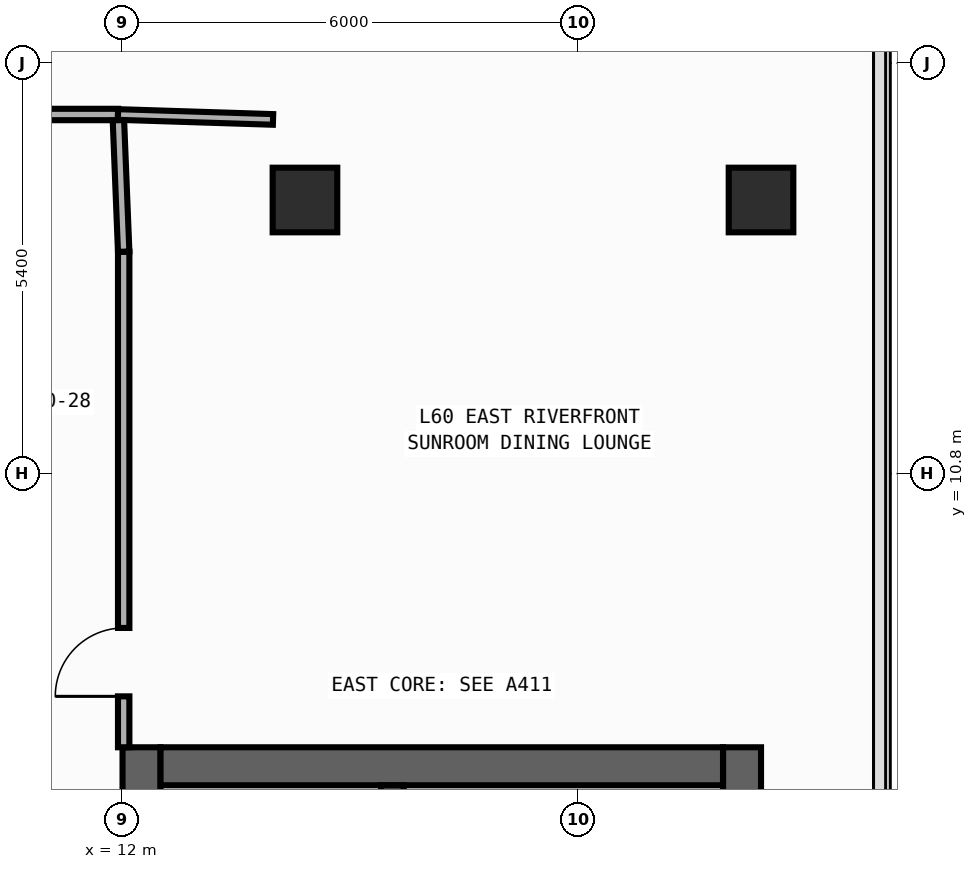
"""IFC4 building model, lengths in metres.
Left out: names, types, materials, properties, quantities, classifications, styles, units other than length and angle.
Written with IfcOpenShell. Run it as: python <this file> out.ifc"""

import sys

from ifc_helpers import new_model, si_unit, direction, frame, frame_2d, origin, origin_2d, place, context, subcontext, project, spatial, rectangle, extrude, element, fill, save


model = new_model("IFC4")
c1 = context("Model", 3, precision=1e-05, world=origin(), true_north=direction((0.0, 1.0)))
c2 = subcontext(c1, "Body", "Model", "MODEL_VIEW")
j1 = project(units=[si_unit("LENGTHUNIT", "METRE"), si_unit("PLANEANGLEUNIT", "RADIAN")], contexts=[c1])
p1 = place(None, origin())
s1 = spatial("IfcSite", under=j1, at=p1, CompositionType="ELEMENT")
p2 = place(p1, origin())
s2 = spatial("IfcBuilding", under=s1, at=p2, CompositionType="ELEMENT")
p3 = place(p2, frame((0.0, 0.0, 254.8)))
s3 = spatial("IfcBuildingStorey", under=s2, at=p3, CompositionType="ELEMENT", Elevation=254.8)
p4 = place(p3, frame((12.25, -19.8, 0.0), z_axis=(0.0, 0.0, 1.0), x_axis=(0.0, 1.0, 0.0)))
e1 = element("IfcWall", 1, at=p4, inside=s3, PredefinedType="SHEAR", context=c2, shape_type="SweptSolid", body=[
    extrude(rectangle(XDim=27.0, YDim=0.5, at=frame_2d((13.5, 0.0))), origin(), (0.0, 0.0, 1.0), 3.34),
])
p5 = place(p4, frame((23.05, 0.0, 0.0)))
e2 = element("IfcOpeningElement", 2, at=p5, cuts=e1, PredefinedType="OPENING", context=c2, shape_type="SweptSolid", body=[
    extrude(rectangle(XDim=1.1, YDim=2.2, at=frame_2d((0.55, 1.1))), frame((0.0, 0.26, 0.0), z_axis=(0.0, -1.0, 0.0), x_axis=(1.0, 0.0, 0.0)), (0.0, 0.0, 1.0), 0.52),
])
p6 = place(p4, frame((19.85, 0.0, 0.0)))
e3 = element("IfcOpeningElement", 3, at=p6, cuts=e1, PredefinedType="OPENING", context=c2, shape_type="SweptSolid", body=[
    extrude(rectangle(XDim=1.1, YDim=2.2, at=frame_2d((0.55, 1.1))), frame((0.0, 0.26, 0.0), z_axis=(0.0, -1.0, 0.0), x_axis=(1.0, 0.0, 0.0)), (0.0, 0.0, 1.0), 0.52),
])
p7 = place(p4, frame((16.65, 0.0, 0.0)))
e4 = element("IfcOpeningElement", 4, at=p7, cuts=e1, PredefinedType="OPENING", context=c2, shape_type="SweptSolid", body=[
    extrude(rectangle(XDim=1.1, YDim=2.2, at=frame_2d((0.55, 1.1))), frame((0.0, 0.26, 0.0), z_axis=(0.0, -1.0, 0.0), x_axis=(1.0, 0.0, 0.0)), (0.0, 0.0, 1.0), 0.52),
])
p8 = place(p4, frame((7.175, 0.0, 0.0)))
e5 = element("IfcOpeningElement", 5, at=p8, cuts=e1, PredefinedType="OPENING", context=c2, shape_type="SweptSolid", body=[
    extrude(rectangle(XDim=0.85, YDim=2.1, at=frame_2d((0.425, 1.05))), frame((0.0, 0.26, 0.0), z_axis=(0.0, -1.0, 0.0), x_axis=(1.0, 0.0, 0.0)), (0.0, 0.0, 1.0), 0.52),
])
p9 = place(p4, frame((10.375, 0.0, 0.0)))
e6 = element("IfcOpeningElement", 6, at=p9, cuts=e1, PredefinedType="OPENING", context=c2, shape_type="SweptSolid", body=[
    extrude(rectangle(XDim=0.85, YDim=2.1, at=frame_2d((0.425, 1.05))), frame((0.0, 0.26, 0.0), z_axis=(0.0, -1.0, 0.0), x_axis=(1.0, 0.0, 0.0)), (0.0, 0.0, 1.0), 0.52),
])
p10 = place(p4, frame((12.725, 0.0, 0.0)))
e7 = element("IfcOpeningElement", 7, at=p10, cuts=e1, PredefinedType="OPENING", context=c2, shape_type="SweptSolid", body=[
    extrude(rectangle(XDim=1.15, YDim=2.2, at=frame_2d((0.575, 1.1))), frame((0.0, 0.26, 0.0), z_axis=(0.0, -1.0, 0.0), x_axis=(1.0, 0.0, 0.0)), (0.0, 0.0, 1.0), 0.52),
])
p11 = place(p4, frame((25.125, 0.0, 0.0)))
e8 = element("IfcOpeningElement", 8, at=p11, cuts=e1, PredefinedType="OPENING", context=c2, shape_type="SweptSolid", body=[
    extrude(rectangle(XDim=0.85, YDim=2.1, at=frame_2d((0.425, 1.05))), frame((0.0, 0.26, 0.0), z_axis=(0.0, -1.0, 0.0), x_axis=(1.0, 0.0, 0.0)), (0.0, 0.0, 1.0), 0.52),
])
p12 = place(p3, frame((20.15, -19.8, 0.0), z_axis=(0.0, 0.0, 1.0), x_axis=(0.0, 1.0, 0.0)))
e9 = element("IfcWall", 9, at=p12, inside=s3, PredefinedType="SHEAR", context=c2, shape_type="SweptSolid", body=[
    extrude(rectangle(XDim=27.0, YDim=0.5, at=frame_2d((13.5, 0.0))), origin(), (0.0, 0.0, 1.0), 3.34),
])
p13 = place(p3, frame((12.5, 6.95, 0.0), z_axis=(0.0, 0.0, 1.0), x_axis=(1.0, 0.0, 0.0)))
e10 = element("IfcWall", 10, at=p13, inside=s3, PredefinedType="SHEAR", context=c2, shape_type="SweptSolid", body=[
    extrude(rectangle(XDim=7.4, YDim=0.5, at=frame_2d((3.7, 0.0))), origin(), (0.0, 0.0, 1.0), 3.34),
])
p14 = place(p3, frame((15.55, -19.3, 0.0), z_axis=(0.0, 0.0, 1.0), x_axis=(0.0, 1.0, 0.0)))
e11 = element("IfcWall", 11, at=p14, inside=s3, PredefinedType="SHEAR", context=c2, shape_type="SweptSolid", body=[
    extrude(rectangle(XDim=26.0, YDim=0.3, at=frame_2d((13.0, 0.0))), origin(), (0.0, 0.0, 1.0), 3.34),
])
p15 = place(p14, frame((12.225, 0.0, 0.0)))
e12 = element("IfcOpeningElement", 12, at=p15, cuts=e11, PredefinedType="OPENING", context=c2, shape_type="SweptSolid", body=[
    extrude(rectangle(XDim=1.15, YDim=2.2, at=frame_2d((0.575, 1.1))), frame((0.0, 0.16, 0.0), z_axis=(0.0, -1.0, 0.0), x_axis=(1.0, 0.0, 0.0)), (0.0, 0.0, 1.0), 0.32),
])
p16 = place(p14, frame((24.625, 0.0, 0.0)))
e13 = element("IfcOpeningElement", 13, at=p16, cuts=e11, PredefinedType="OPENING", context=c2, shape_type="SweptSolid", body=[
    extrude(rectangle(XDim=0.85, YDim=2.1, at=frame_2d((0.425, 1.05))), frame((0.0, 0.16, 0.0), z_axis=(0.0, -1.0, 0.0), x_axis=(1.0, 0.0, 0.0)), (0.0, 0.0, 1.0), 0.32),
])
for number, where, z_axis, x_axis in (
    (14, (20.4, 14.4, 0.0), (0.0, 0.0, 1.0), (1.0, 0.0, 0.0)),
    (15, (14.4, 14.4, 0.0), (0.0, 0.0, 1.0), (1.0, 0.0, 0.0)),
):
    element("IfcColumn", number, at=place(p3, frame(where, z_axis=z_axis, x_axis=x_axis)), inside=s3, PredefinedType="COLUMN", context=c2, shape_type="SweptSolid", body=[
        extrude(rectangle(XDim=0.85, YDim=0.85, at=origin_2d()), origin(), (0.0, 0.0, 1.0), 3.6),
    ])
p17 = place(p3, frame((12.015, 7.2, 0.0), z_axis=(0.0, 0.0, 1.0), x_axis=(0.0, 1.0, 0.0)))
e16 = element("IfcWall", 16, at=p17, inside=s3, PredefinedType="PARTITIONING", context=c2, shape_type="SweptSolid", body=[
    extrude(rectangle(XDim=6.52, YDim=0.15, at=frame_2d((3.26, 0.0))), origin(), (0.0, 0.0, 1.0), 3.34),
])
p18 = place(p17, frame((0.67, 0.0, 0.0)))
e17 = element("IfcOpeningElement", 17, at=p18, cuts=e16, PredefinedType="OPENING", context=c2, shape_type="SweptSolid", body=[
    extrude(rectangle(XDim=0.9, YDim=2.15, at=frame_2d((0.45, 1.075))), frame((0.0, 0.085, 0.0), z_axis=(0.0, -1.0, 0.0), x_axis=(1.0, 0.0, 0.0)), (0.0, 0.0, 1.0), 0.17),
])
p19 = place(p3, frame((9.86, 15.525, 0.0), z_axis=(0.0, 0.0, 1.0), x_axis=(1.0, 0.0, 0.0)))
e18 = element("IfcWall", 18, at=p19, inside=s3, PredefinedType="PARTITIONING", context=c2, shape_type="SweptSolid", body=[
    extrude(rectangle(XDim=2.08, YDim=0.15, at=frame_2d((1.04, 0.0))), origin(), (0.0, 0.0, 1.0), 3.34),
])
p20 = place(p3, frame((12.015, 13.72, 0.0), z_axis=(0.0, 0.0, 1.0), x_axis=(-0.040046877756, 0.99919780203, 0.0)))
e19 = element("IfcWall", 19, at=p20, inside=s3, PredefinedType="PARTITIONING", context=c2, shape_type="SweptSolid", body=[
    extrude(rectangle(XDim=1.731, YDim=0.15, at=frame_2d((0.866, 0.0))), origin(), (0.0, 0.0, 1.0), 3.34),
])
p21 = place(p3, frame((11.94, 15.525, 0.0), z_axis=(0.0, 0.0, 1.0), x_axis=(0.999493701671, -0.031817295912, 0.0)))
e20 = element("IfcWall", 20, at=p21, inside=s3, PredefinedType="PARTITIONING", context=c2, shape_type="SweptSolid", body=[
    extrude(rectangle(XDim=2.041, YDim=0.14, at=frame_2d((1.021, 0.0))), origin(), (0.0, 0.0, 1.0), 3.34),
])
p22 = place(p18, origin())
e21 = element("IfcDoor", 21, at=p22, inside=s3, OperationType="SINGLE_SWING_LEFT", PredefinedType="DOOR", context=c2, shape_type="SweptSolid", body=[
    extrude(rectangle(XDim=0.9, YDim=2.15, at=frame_2d((0.45, 1.075))), frame((0.0, 0.025, 0.0), z_axis=(0.0, -1.0, 0.0), x_axis=(1.0, 0.0, 0.0)), (0.0, 0.0, 1.0), 0.05),
])
fill(e17, e21)
save(model, sys.argv[1])
